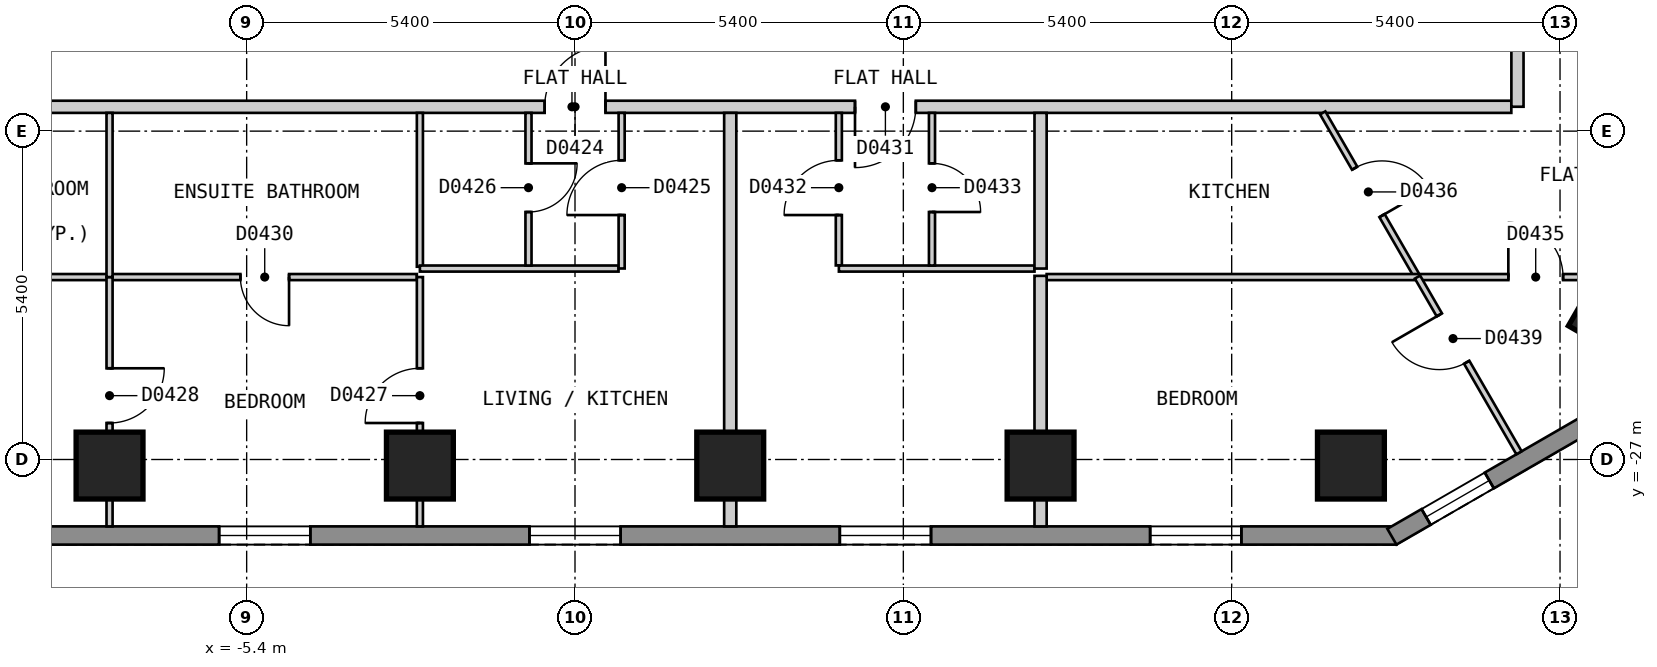
"""IFC4 building model, lengths in metres.
Left out: names, types, materials, properties, quantities, classifications, styles, units other than length and angle.
Written with IfcOpenShell. Run it as: python <this file> out.ifc"""

import sys

from ifc_helpers import new_model, si_unit, direction, frame, frame_2d, origin, origin_2d, place, context, subcontext, project, spatial, polyline, rectangle, outline, extrude, element, fill, save


model = new_model("IFC4")
c1 = context("Model", 3, precision=1e-05, world=origin(), true_north=direction((0.0, 1.0)))
c2 = subcontext(c1, "Body", "Model", "MODEL_VIEW")
j1 = project(units=[si_unit("LENGTHUNIT", "METRE"), si_unit("PLANEANGLEUNIT", "RADIAN")], contexts=[c1])
p1 = place(None, origin())
s1 = spatial("IfcSite", under=j1, at=p1, CompositionType="ELEMENT")
p2 = place(p1, origin())
s2 = spatial("IfcBuilding", under=s1, at=p2, CompositionType="ELEMENT")
p3 = place(p2, frame((0.0, 0.0, 32.4)))
s3 = spatial("IfcBuildingStorey", under=s2, at=p3, CompositionType="ELEMENT", Elevation=32.4)
for number, where, z_axis, x_axis in (
    (1, (-7.655, -27.1, 0.0), (0.0, 0.0, 1.0), (1.0, 0.0, 0.0)),
    (2, (-2.551, -27.1, 0.0), (0.0, 0.0, 1.0), (1.0, 0.0, 0.0)),
    (3, (2.553, -27.1, 0.0), (0.0, 0.0, 1.0), (1.0, 0.0, 0.0)),
    (4, (7.657, -27.1, 0.0), (0.0, 0.0, 1.0), (1.0, 0.0, 0.0)),
    (5, (12.761, -27.1, 0.0), (0.0, 0.0, 1.0), (1.0, 0.0, 0.0)),
    (6, (17.09, -24.6, 0.0), (0.0, 0.0, 1.0), (0.5, 0.866, 0.0)),
):
    element("IfcColumn", number, at=place(p3, frame(where, z_axis=z_axis, x_axis=x_axis)), inside=s3, PredefinedType="COLUMN", context=c2, shape_type="SweptSolid", body=[
        extrude(rectangle(XDim=1.1, YDim=1.1, at=origin_2d()), origin(), (0.0, 0.0, 1.0), 3.0),
    ])
p4 = place(p3, frame((-13.51, -28.25, 0.0), z_axis=(0.0, 0.0, 1.0), x_axis=(1.0, 0.0, 0.0)))
e7 = element("IfcWall", 7, at=p4, inside=s3, PredefinedType="SOLIDWALL", context=c2, shape_type="SweptSolid", body=[
    extrude(outline(polyline([(0.0, -0.15), (27.02, -0.15), (26.94, 0.15), (0.08, 0.15), (0.0, -0.15)])), origin(), (0.0, 0.0, 1.0), 2.7),
])
p5 = place(p4, frame((2.553, 0.0, 0.15)))
e8 = element("IfcOpeningElement", 8, at=p5, cuts=e7, PredefinedType="OPENING", context=c2, shape_type="SweptSolid", body=[
    extrude(rectangle(XDim=1.5, YDim=2.1, at=frame_2d((0.75, 1.05))), frame((0.0, 0.16, 0.0), z_axis=(0.0, -1.0, 0.0), x_axis=(1.0, 0.0, 0.0)), (0.0, 0.0, 1.0), 0.32),
])
p6 = place(p4, frame((7.657, 0.0, 0.15)))
e9 = element("IfcOpeningElement", 9, at=p6, cuts=e7, PredefinedType="OPENING", context=c2, shape_type="SweptSolid", body=[
    extrude(rectangle(XDim=1.5, YDim=2.1, at=frame_2d((0.75, 1.05))), frame((0.0, 0.16, 0.0), z_axis=(0.0, -1.0, 0.0), x_axis=(1.0, 0.0, 0.0)), (0.0, 0.0, 1.0), 0.32),
])
p7 = place(p4, frame((12.761, 0.0, 0.15)))
e10 = element("IfcOpeningElement", 10, at=p7, cuts=e7, PredefinedType="OPENING", context=c2, shape_type="SweptSolid", body=[
    extrude(rectangle(XDim=1.5, YDim=2.1, at=frame_2d((0.75, 1.05))), frame((0.0, 0.16, 0.0), z_axis=(0.0, -1.0, 0.0), x_axis=(1.0, 0.0, 0.0)), (0.0, 0.0, 1.0), 0.32),
])
p8 = place(p4, frame((17.865, 0.0, 0.15)))
e11 = element("IfcOpeningElement", 11, at=p8, cuts=e7, PredefinedType="OPENING", context=c2, shape_type="SweptSolid", body=[
    extrude(rectangle(XDim=1.5, YDim=2.1, at=frame_2d((0.75, 1.05))), frame((0.0, 0.16, 0.0), z_axis=(0.0, -1.0, 0.0), x_axis=(1.0, 0.0, 0.0)), (0.0, 0.0, 1.0), 0.32),
])
p9 = place(p4, frame((22.969, 0.0, 0.15)))
e12 = element("IfcOpeningElement", 12, at=p9, cuts=e7, PredefinedType="OPENING", context=c2, shape_type="SweptSolid", body=[
    extrude(rectangle(XDim=1.5, YDim=2.1, at=frame_2d((0.75, 1.05))), frame((0.0, 0.16, 0.0), z_axis=(0.0, -1.0, 0.0), x_axis=(1.0, 0.0, 0.0)), (0.0, 0.0, 1.0), 0.32),
])
p10 = place(p3, frame((13.435, -28.27, 0.0), z_axis=(0.0, 0.0, 1.0), x_axis=(0.866010750942, 0.50002537861, 0.0)))
e13 = element("IfcWall", 13, at=p10, inside=s3, PredefinedType="SOLIDWALL", context=c2, shape_type="SweptSolid", body=[
    extrude(outline(polyline([(0.0, -0.15), (5.0, -0.15), (4.919, 0.15), (0.08, 0.15), (0.0, -0.15)])), origin(), (0.0, 0.0, 1.0), 2.7),
])
p11 = place(p10, frame((0.65, 0.0, 0.15)))
e14 = element("IfcOpeningElement", 14, at=p11, cuts=e13, PredefinedType="OPENING", context=c2, shape_type="SweptSolid", body=[
    extrude(rectangle(XDim=1.2, YDim=2.1, at=frame_2d((0.6, 1.05))), frame((0.0, 0.16, 0.0), z_axis=(0.0, -1.0, 0.0), x_axis=(1.0, 0.0, 0.0)), (0.0, 0.0, 1.0), 0.32),
])
p12 = place(p3, frame((-15.499, -21.2, 0.0), z_axis=(0.0, 0.0, 1.0), x_axis=(1.0, 0.0, 0.0)))
e15 = element("IfcWall", 15, at=p12, inside=s3, PredefinedType="PARTITIONING", context=c2, shape_type="SweptSolid", body=[
    extrude(rectangle(XDim=30.898, YDim=0.2, at=frame_2d((15.449, 0.0))), origin(), (0.0, 0.0, 1.0), 2.7),
])
p13 = place(p12, frame((15.0, 0.0, 0.0)))
e16 = element("IfcOpeningElement", 16, at=p13, cuts=e15, PredefinedType="OPENING", context=c2, shape_type="SweptSolid", body=[
    extrude(rectangle(XDim=1.0, YDim=2.1, at=frame_2d((0.5, 1.05))), frame((0.0, 0.11, 0.0), z_axis=(0.0, -1.0, 0.0), x_axis=(1.0, 0.0, 0.0)), (0.0, 0.0, 1.0), 0.22),
])
p14 = place(p12, frame((20.104, 0.0, 0.0)))
e17 = element("IfcOpeningElement", 17, at=p14, cuts=e15, PredefinedType="OPENING", context=c2, shape_type="SweptSolid", body=[
    extrude(rectangle(XDim=1.0, YDim=2.1, at=frame_2d((0.5, 1.05))), frame((0.0, 0.11, 0.0), z_axis=(0.0, -1.0, 0.0), x_axis=(1.0, 0.0, 0.0)), (0.0, 0.0, 1.0), 0.22),
])
p15 = place(p3, frame((15.5, -21.199, 0.0), z_axis=(0.0, 0.0, 1.0), x_axis=(0.0, 1.0, 0.0)))
e18 = element("IfcWall", 18, at=p15, inside=s3, PredefinedType="PARTITIONING", context=c2, shape_type="SweptSolid", body=[
    extrude(rectangle(XDim=7.575, YDim=0.2, at=frame_2d((3.788, 0.0))), origin(), (0.0, 0.0, 1.0), 2.7),
])
p16 = place(p15, frame((1.188, 0.0, 0.0)))
e19 = element("IfcOpeningElement", 19, at=p16, cuts=e18, PredefinedType="OPENING", context=c2, shape_type="SweptSolid", body=[
    extrude(rectangle(XDim=1.0, YDim=2.1, at=frame_2d((0.5, 1.05))), frame((0.0, 0.11, 0.0), z_axis=(0.0, -1.0, 0.0), x_axis=(1.0, 0.0, 0.0)), (0.0, 0.0, 1.0), 0.22),
])
p17 = place(p3, frame((12.297, -21.3, 0.0), z_axis=(0.0, 0.0, 1.0), x_axis=(0.500004896655, -0.866022576681, 0.0)))
e20 = element("IfcWall", 20, at=p17, inside=s3, PredefinedType="PARTITIONING", context=c2, shape_type="SweptSolid", body=[
    extrude(rectangle(XDim=3.118, YDim=0.1, at=frame_2d((1.559, 0.0))), origin(), (0.0, 0.0, 1.0), 2.7),
])
p18 = place(p17, frame((1.051, 0.0, 0.0)))
e21 = element("IfcOpeningElement", 21, at=p18, cuts=e20, PredefinedType="OPENING", context=c2, shape_type="SweptSolid", body=[
    extrude(rectangle(XDim=0.9, YDim=2.1, at=frame_2d((0.45, 1.05))), frame((0.0, 0.06, 0.0), z_axis=(0.0, -1.0, 0.0), x_axis=(1.0, 0.0, 0.0)), (0.0, 0.0, 1.0), 0.12),
])
p19 = place(p3, frame((-2.551, -21.3, 0.0), z_axis=(0.0, 0.0, 1.0), x_axis=(0.0, -1.0, 0.0)))
e22 = element("IfcWall", 22, at=p19, inside=s3, PredefinedType="PARTITIONING", context=c2, shape_type="SweptSolid", body=[
    extrude(rectangle(XDim=2.53, YDim=0.1, at=frame_2d((1.265, 0.0))), origin(), (0.0, 0.0, 1.0), 2.7),
])
p20 = place(p3, frame((4.339, -21.3, 0.0), z_axis=(0.0, 0.0, 1.0), x_axis=(0.0, -1.0, 0.0)))
e23 = element("IfcWall", 23, at=p20, inside=s3, PredefinedType="PARTITIONING", context=c2, shape_type="SweptSolid", body=[
    extrude(rectangle(XDim=2.509, YDim=0.1, at=frame_2d((1.254, 0.0))), origin(), (0.0, 0.0, 1.0), 2.7),
])
p21 = place(p20, frame((0.78, 0.0, 0.0)))
e24 = element("IfcOpeningElement", 24, at=p21, cuts=e23, PredefinedType="OPENING", context=c2, shape_type="SweptSolid", body=[
    extrude(rectangle(XDim=0.9, YDim=2.1, at=frame_2d((0.45, 1.05))), frame((0.0, 0.06, 0.0), z_axis=(0.0, -1.0, 0.0), x_axis=(1.0, 0.0, 0.0)), (0.0, 0.0, 1.0), 0.12),
])
p22 = place(p3, frame((-2.551, -23.86, 0.0), z_axis=(0.0, 0.0, 1.0), x_axis=(1.0, 0.0, 0.0)))
e25 = element("IfcWall", 25, at=p22, inside=s3, PredefinedType="PARTITIONING", context=c2, shape_type="SweptSolid", body=[
    extrude(rectangle(XDim=3.267, YDim=0.1, at=frame_2d((1.634, 0.0))), origin(), (0.0, 0.0, 1.0), 2.7),
])
p23 = place(p3, frame((4.34, -23.86, 0.0), z_axis=(0.0, 0.0, 1.0), x_axis=(1.0, 0.0, 0.0)))
e26 = element("IfcWall", 26, at=p23, inside=s3, PredefinedType="PARTITIONING", context=c2, shape_type="SweptSolid", body=[
    extrude(rectangle(XDim=3.217, YDim=0.1, at=frame_2d((1.608, 0.0))), origin(), (0.0, 0.0, 1.0), 2.7),
])
p24 = place(p3, frame((-15.848, -24.0, 0.0), z_axis=(0.0, 0.0, 1.0), x_axis=(1.0, 0.0, 0.0)))
e27 = element("IfcWall", 27, at=p24, inside=s3, PredefinedType="PARTITIONING", context=c2, shape_type="SweptSolid", body=[
    extrude(rectangle(XDim=13.247, YDim=0.1, at=frame_2d((6.624, 0.0))), origin(), (0.0, 0.0, 1.0), 2.7),
])
p25 = place(p24, frame((3.596, 0.0, 0.0)))
e28 = element("IfcOpeningElement", 28, at=p25, cuts=e27, PredefinedType="OPENING", context=c2, shape_type="SweptSolid", body=[
    extrude(rectangle(XDim=0.8, YDim=2.1, at=frame_2d((0.4, 1.05))), frame((0.0, 0.06, 0.0), z_axis=(0.0, -1.0, 0.0), x_axis=(1.0, 0.0, 0.0)), (0.0, 0.0, 1.0), 0.12),
])
p26 = place(p24, frame((10.345, 0.0, 0.0)))
e29 = element("IfcOpeningElement", 29, at=p26, cuts=e27, PredefinedType="OPENING", context=c2, shape_type="SweptSolid", body=[
    extrude(rectangle(XDim=0.8, YDim=2.1, at=frame_2d((0.4, 1.05))), frame((0.0, 0.06, 0.0), z_axis=(0.0, -1.0, 0.0), x_axis=(1.0, 0.0, 0.0)), (0.0, 0.0, 1.0), 0.12),
])
p27 = place(p3, frame((7.757, -24.0, 0.0), z_axis=(0.0, 0.0, 1.0), x_axis=(1.0, 0.0, 0.0)))
e30 = element("IfcWall", 30, at=p27, inside=s3, PredefinedType="PARTITIONING", context=c2, shape_type="SweptSolid", body=[
    extrude(rectangle(XDim=10.493, YDim=0.1, at=frame_2d((5.247, 0.0))), origin(), (0.0, 0.0, 1.0), 2.7),
])
p28 = place(p27, frame((7.593, 0.0, 0.0)))
e31 = element("IfcOpeningElement", 31, at=p28, cuts=e30, PredefinedType="OPENING", context=c2, shape_type="SweptSolid", body=[
    extrude(rectangle(XDim=0.9, YDim=2.1, at=frame_2d((0.45, 1.05))), frame((0.0, 0.06, 0.0), z_axis=(0.0, -1.0, 0.0), x_axis=(1.0, 0.0, 0.0)), (0.0, 0.0, 1.0), 0.12),
])
p29 = place(p3, frame((5.871, -23.81, 0.0), z_axis=(0.0, 0.0, 1.0), x_axis=(0.0, 1.0, 0.0)))
e32 = element("IfcWall", 32, at=p29, inside=s3, PredefinedType="PARTITIONING", context=c2, shape_type="SweptSolid", body=[
    extrude(rectangle(XDim=2.51, YDim=0.1, at=frame_2d((1.255, 0.0))), origin(), (0.0, 0.0, 1.0), 2.7),
])
p30 = place(p29, frame((0.88, 0.0, 0.0)))
e33 = element("IfcOpeningElement", 33, at=p30, cuts=e32, PredefinedType="OPENING", context=c2, shape_type="SweptSolid", body=[
    extrude(rectangle(XDim=0.8, YDim=2.1, at=frame_2d((0.4, 1.05))), frame((0.0, 0.06, 0.0), z_axis=(0.0, -1.0, 0.0), x_axis=(1.0, 0.0, 0.0)), (0.0, 0.0, 1.0), 0.12),
])
p31 = place(p3, frame((0.767, -23.859, 0.0), z_axis=(0.0, 0.0, 1.0), x_axis=(0.0, 1.0, 0.0)))
e34 = element("IfcWall", 34, at=p31, inside=s3, PredefinedType="PARTITIONING", context=c2, shape_type="SweptSolid", body=[
    extrude(rectangle(XDim=2.559, YDim=0.1, at=frame_2d((1.279, 0.0))), origin(), (0.0, 0.0, 1.0), 2.7),
])
p32 = place(p31, frame((0.879, 0.0, 0.0)))
e35 = element("IfcOpeningElement", 35, at=p32, cuts=e34, PredefinedType="OPENING", context=c2, shape_type="SweptSolid", body=[
    extrude(rectangle(XDim=0.9, YDim=2.1, at=frame_2d((0.45, 1.05))), frame((0.0, 0.06, 0.0), z_axis=(0.0, -1.0, 0.0), x_axis=(1.0, 0.0, 0.0)), (0.0, 0.0, 1.0), 0.12),
])
p33 = place(p3, frame((-0.765, -23.81, 0.0), z_axis=(0.0, 0.0, 1.0), x_axis=(0.0, 1.0, 0.0)))
e36 = element("IfcWall", 36, at=p33, inside=s3, PredefinedType="PARTITIONING", context=c2, shape_type="SweptSolid", body=[
    extrude(rectangle(XDim=2.51, YDim=0.1, at=frame_2d((1.255, 0.0))), origin(), (0.0, 0.0, 1.0), 2.7),
])
p34 = place(p33, frame((0.88, 0.0, 0.0)))
e37 = element("IfcOpeningElement", 37, at=p34, cuts=e36, PredefinedType="OPENING", context=c2, shape_type="SweptSolid", body=[
    extrude(rectangle(XDim=0.8, YDim=2.1, at=frame_2d((0.4, 1.05))), frame((0.0, 0.06, 0.0), z_axis=(0.0, -1.0, 0.0), x_axis=(1.0, 0.0, 0.0)), (0.0, 0.0, 1.0), 0.12),
])
p35 = place(p3, frame((-7.655, -28.1, 0.0), z_axis=(0.0, 0.0, 1.0), x_axis=(0.0, 1.0, 0.0)))
e38 = element("IfcWall", 38, at=p35, inside=s3, PredefinedType="PARTITIONING", context=c2, shape_type="SweptSolid", body=[
    extrude(rectangle(XDim=4.1, YDim=0.1, at=frame_2d((2.05, 0.0))), origin(), (0.0, 0.0, 1.0), 2.7),
])
p36 = place(p35, frame((1.7, 0.0, 0.0)))
e39 = element("IfcOpeningElement", 39, at=p36, cuts=e38, PredefinedType="OPENING", context=c2, shape_type="SweptSolid", body=[
    extrude(rectangle(XDim=0.9, YDim=2.1, at=frame_2d((0.45, 1.05))), frame((0.0, 0.06, 0.0), z_axis=(0.0, -1.0, 0.0), x_axis=(1.0, 0.0, 0.0)), (0.0, 0.0, 1.0), 0.12),
])
p37 = place(p3, frame((-2.551, -28.1, 0.0), z_axis=(0.0, 0.0, 1.0), x_axis=(0.0, 1.0, 0.0)))
e40 = element("IfcWall", 40, at=p37, inside=s3, PredefinedType="PARTITIONING", context=c2, shape_type="SweptSolid", body=[
    extrude(rectangle(XDim=4.1, YDim=0.1, at=frame_2d((2.05, 0.0))), origin(), (0.0, 0.0, 1.0), 2.7),
])
p38 = place(p37, frame((1.7, 0.0, 0.0)))
e41 = element("IfcOpeningElement", 41, at=p38, cuts=e40, PredefinedType="OPENING", context=c2, shape_type="SweptSolid", body=[
    extrude(rectangle(XDim=0.9, YDim=2.1, at=frame_2d((0.45, 1.05))), frame((0.0, 0.06, 0.0), z_axis=(0.0, -1.0, 0.0), x_axis=(1.0, 0.0, 0.0)), (0.0, 0.0, 1.0), 0.12),
])
p39 = place(p3, frame((2.553, -21.3, 0.0), z_axis=(0.0, 0.0, 1.0), x_axis=(0.0, -1.0, 0.0)))
e42 = element("IfcWall", 42, at=p39, inside=s3, PredefinedType="PARTITIONING", context=c2, shape_type="SweptSolid", body=[
    extrude(rectangle(XDim=6.8, YDim=0.2, at=frame_2d((3.4, 0.0))), origin(), (0.0, 0.0, 1.0), 2.7),
])
p40 = place(p3, frame((7.657, -28.1, 0.0), z_axis=(0.0, 0.0, 1.0), x_axis=(0.0, 1.0, 0.0)))
e43 = element("IfcWall", 43, at=p40, inside=s3, PredefinedType="PARTITIONING", context=c2, shape_type="SweptSolid", body=[
    extrude(rectangle(XDim=4.12, YDim=0.2, at=frame_2d((2.06, 0.0))), origin(), (0.0, 0.0, 1.0), 2.7),
])
p41 = place(p3, frame((7.657, -23.86, 0.0), z_axis=(0.0, 0.0, 1.0), x_axis=(0.0, 1.0, 0.0)))
e44 = element("IfcWall", 44, at=p41, inside=s3, PredefinedType="PARTITIONING", context=c2, shape_type="SweptSolid", body=[
    extrude(rectangle(XDim=2.56, YDim=0.2, at=frame_2d((1.28, 0.0))), origin(), (0.0, 0.0, 1.0), 2.7),
])
p42 = place(p3, frame((13.856, -24.0, 0.0), z_axis=(0.0, 0.0, 1.0), x_axis=(0.50010451262, -0.865965054986, 0.0)))
e45 = element("IfcWall", 45, at=p42, inside=s3, PredefinedType="PARTITIONING", context=c2, shape_type="SweptSolid", body=[
    extrude(rectangle(XDim=3.337, YDim=0.1, at=frame_2d((1.668, 0.0))), origin(), (0.0, 0.0, 1.0), 2.7),
])
p43 = place(p42, frame((0.718, 0.0, 0.0)))
e46 = element("IfcOpeningElement", 46, at=p43, cuts=e45, PredefinedType="OPENING", context=c2, shape_type="SweptSolid", body=[
    extrude(rectangle(XDim=0.9, YDim=2.1, at=frame_2d((0.45, 1.05))), frame((0.0, 0.06, 0.0), z_axis=(0.0, -1.0, 0.0), x_axis=(1.0, 0.0, 0.0)), (0.0, 0.0, 1.0), 0.12),
])
p44 = place(p3, frame((-7.655, -24.0, 0.0), z_axis=(0.0, 0.0, 1.0), x_axis=(0.0, 1.0, 0.0)))
e47 = element("IfcWall", 47, at=p44, inside=s3, PredefinedType="PARTITIONING", context=c2, shape_type="SweptSolid", body=[
    extrude(rectangle(XDim=2.7, YDim=0.1, at=frame_2d((1.35, 0.0))), origin(), (0.0, 0.0, 1.0), 2.7),
])
p45 = place(p6, origin())
e48 = element("IfcWindow", 48, at=p45, inside=s3, PartitioningType="SINGLE_PANEL", PredefinedType="WINDOW", context=c2, shape_type="SweptSolid", body=[
    extrude(rectangle(XDim=1.5, YDim=2.1, at=frame_2d((0.75, 1.05))), frame((0.0, 0.03, 0.0), z_axis=(0.0, -1.0, 0.0), x_axis=(1.0, 0.0, 0.0)), (0.0, 0.0, 1.0), 0.06),
])
fill(e9, e48)
p46 = place(p7, origin())
e49 = element("IfcWindow", 49, at=p46, inside=s3, PartitioningType="SINGLE_PANEL", PredefinedType="WINDOW", context=c2, shape_type="SweptSolid", body=[
    extrude(rectangle(XDim=1.5, YDim=2.1, at=frame_2d((0.75, 1.05))), frame((0.0, 0.03, 0.0), z_axis=(0.0, -1.0, 0.0), x_axis=(1.0, 0.0, 0.0)), (0.0, 0.0, 1.0), 0.06),
])
fill(e10, e49)
p47 = place(p8, origin())
e50 = element("IfcWindow", 50, at=p47, inside=s3, PartitioningType="SINGLE_PANEL", PredefinedType="WINDOW", context=c2, shape_type="SweptSolid", body=[
    extrude(rectangle(XDim=1.5, YDim=2.1, at=frame_2d((0.75, 1.05))), frame((0.0, 0.03, 0.0), z_axis=(0.0, -1.0, 0.0), x_axis=(1.0, 0.0, 0.0)), (0.0, 0.0, 1.0), 0.06),
])
fill(e11, e50)
p48 = place(p9, origin())
e51 = element("IfcWindow", 51, at=p48, inside=s3, PartitioningType="SINGLE_PANEL", PredefinedType="WINDOW", context=c2, shape_type="SweptSolid", body=[
    extrude(rectangle(XDim=1.5, YDim=2.1, at=frame_2d((0.75, 1.05))), frame((0.0, 0.03, 0.0), z_axis=(0.0, -1.0, 0.0), x_axis=(1.0, 0.0, 0.0)), (0.0, 0.0, 1.0), 0.06),
])
fill(e12, e51)
p49 = place(p11, origin())
e52 = element("IfcWindow", 52, at=p49, inside=s3, PartitioningType="SINGLE_PANEL", PredefinedType="WINDOW", context=c2, shape_type="SweptSolid", body=[
    extrude(rectangle(XDim=1.2, YDim=2.1, at=frame_2d((0.6, 1.05))), frame((0.0, 0.03, 0.0), z_axis=(0.0, -1.0, 0.0), x_axis=(1.0, 0.0, 0.0)), (0.0, 0.0, 1.0), 0.06),
])
fill(e14, e52)
p50 = place(p13, origin())
e53 = element("IfcDoor", 53, at=p50, inside=s3, OperationType="SINGLE_SWING_RIGHT", PredefinedType="DOOR", context=c2, shape_type="SweptSolid", body=[
    extrude(rectangle(XDim=1.0, YDim=2.1, at=frame_2d((0.5, 1.05))), frame((0.0, 0.025, 0.0), z_axis=(0.0, -1.0, 0.0), x_axis=(1.0, 0.0, 0.0)), (0.0, 0.0, 1.0), 0.05),
])
fill(e16, e53)
p51 = place(p32, origin())
e54 = element("IfcDoor", 54, at=p51, inside=s3, OperationType="SINGLE_SWING_LEFT", PredefinedType="DOOR", context=c2, shape_type="SweptSolid", body=[
    extrude(rectangle(XDim=0.9, YDim=2.1, at=frame_2d((0.45, 1.05))), frame((0.0, 0.025, 0.0), z_axis=(0.0, -1.0, 0.0), x_axis=(1.0, 0.0, 0.0)), (0.0, 0.0, 1.0), 0.05),
])
fill(e35, e54)
p52 = place(p34, origin())
e55 = element("IfcDoor", 55, at=p52, inside=s3, OperationType="SINGLE_SWING_RIGHT", PredefinedType="DOOR", context=c2, shape_type="SweptSolid", body=[
    extrude(rectangle(XDim=0.8, YDim=2.1, at=frame_2d((0.4, 1.05))), frame((0.0, 0.025, 0.0), z_axis=(0.0, -1.0, 0.0), x_axis=(1.0, 0.0, 0.0)), (0.0, 0.0, 1.0), 0.05),
])
fill(e37, e55)
p53 = place(p38, origin())
e56 = element("IfcDoor", 56, at=p53, inside=s3, OperationType="SINGLE_SWING_LEFT", PredefinedType="DOOR", context=c2, shape_type="SweptSolid", body=[
    extrude(rectangle(XDim=0.9, YDim=2.1, at=frame_2d((0.45, 1.05))), frame((0.0, 0.025, 0.0), z_axis=(0.0, -1.0, 0.0), x_axis=(1.0, 0.0, 0.0)), (0.0, 0.0, 1.0), 0.05),
])
fill(e41, e56)
p54 = place(p36, origin())
e57 = element("IfcDoor", 57, at=p54, inside=s3, OperationType="SINGLE_SWING_RIGHT", PredefinedType="DOOR", context=c2, shape_type="SweptSolid", body=[
    extrude(rectangle(XDim=0.9, YDim=2.1, at=frame_2d((0.45, 1.05))), frame((0.0, 0.025, 0.0), z_axis=(0.0, -1.0, 0.0), x_axis=(1.0, 0.0, 0.0)), (0.0, 0.0, 1.0), 0.05),
])
fill(e39, e57)
p55 = place(p26, origin())
e58 = element("IfcDoor", 58, at=p55, inside=s3, OperationType="SINGLE_SWING_RIGHT", PredefinedType="DOOR", context=c2, shape_type="SweptSolid", body=[
    extrude(rectangle(XDim=0.8, YDim=2.1, at=frame_2d((0.4, 1.05))), frame((0.0, 0.025, 0.0), z_axis=(0.0, -1.0, 0.0), x_axis=(1.0, 0.0, 0.0)), (0.0, 0.0, 1.0), 0.05),
])
fill(e29, e58)
p56 = place(p14, origin())
e59 = element("IfcDoor", 59, at=p56, inside=s3, OperationType="SINGLE_SWING_LEFT", PredefinedType="DOOR", context=c2, shape_type="SweptSolid", body=[
    extrude(rectangle(XDim=1.0, YDim=2.1, at=frame_2d((0.5, 1.05))), frame((0.0, 0.025, 0.0), z_axis=(0.0, -1.0, 0.0), x_axis=(1.0, 0.0, 0.0)), (0.0, 0.0, 1.0), 0.05),
])
fill(e17, e59)
p57 = place(p21, origin())
e60 = element("IfcDoor", 60, at=p57, inside=s3, OperationType="SINGLE_SWING_RIGHT", PredefinedType="DOOR", context=c2, shape_type="SweptSolid", body=[
    extrude(rectangle(XDim=0.9, YDim=2.1, at=frame_2d((0.45, 1.05))), frame((0.0, 0.025, 0.0), z_axis=(0.0, -1.0, 0.0), x_axis=(1.0, 0.0, 0.0)), (0.0, 0.0, 1.0), 0.05),
])
fill(e24, e60)
p58 = place(p30, origin())
e61 = element("IfcDoor", 61, at=p58, inside=s3, OperationType="SINGLE_SWING_LEFT", PredefinedType="DOOR", context=c2, shape_type="SweptSolid", body=[
    extrude(rectangle(XDim=0.8, YDim=2.1, at=frame_2d((0.4, 1.05))), frame((0.0, 0.025, 0.0), z_axis=(0.0, -1.0, 0.0), x_axis=(1.0, 0.0, 0.0)), (0.0, 0.0, 1.0), 0.05),
])
fill(e33, e61)
p59 = place(p28, origin())
e62 = element("IfcDoor", 62, at=p59, inside=s3, OperationType="SINGLE_SWING_LEFT", PredefinedType="DOOR", context=c2, shape_type="SweptSolid", body=[
    extrude(rectangle(XDim=0.9, YDim=2.1, at=frame_2d((0.45, 1.05))), frame((0.0, 0.025, 0.0), z_axis=(0.0, -1.0, 0.0), x_axis=(1.0, 0.0, 0.0)), (0.0, 0.0, 1.0), 0.05),
])
fill(e31, e62)
p60 = place(p18, origin())
e63 = element("IfcDoor", 63, at=p60, inside=s3, OperationType="SINGLE_SWING_RIGHT", PredefinedType="DOOR", context=c2, shape_type="SweptSolid", body=[
    extrude(rectangle(XDim=0.9, YDim=2.1, at=frame_2d((0.45, 1.05))), frame((0.0, 0.025, 0.0), z_axis=(0.0, -1.0, 0.0), x_axis=(1.0, 0.0, 0.0)), (0.0, 0.0, 1.0), 0.05),
])
fill(e21, e63)
p61 = place(p43, origin())
e64 = element("IfcDoor", 64, at=p61, inside=s3, OperationType="SINGLE_SWING_LEFT", PredefinedType="DOOR", context=c2, shape_type="SweptSolid", body=[
    extrude(rectangle(XDim=0.9, YDim=2.1, at=frame_2d((0.45, 1.05))), frame((0.0, 0.025, 0.0), z_axis=(0.0, -1.0, 0.0), x_axis=(1.0, 0.0, 0.0)), (0.0, 0.0, 1.0), 0.05),
])
fill(e46, e64)
save(model, sys.argv[1])
